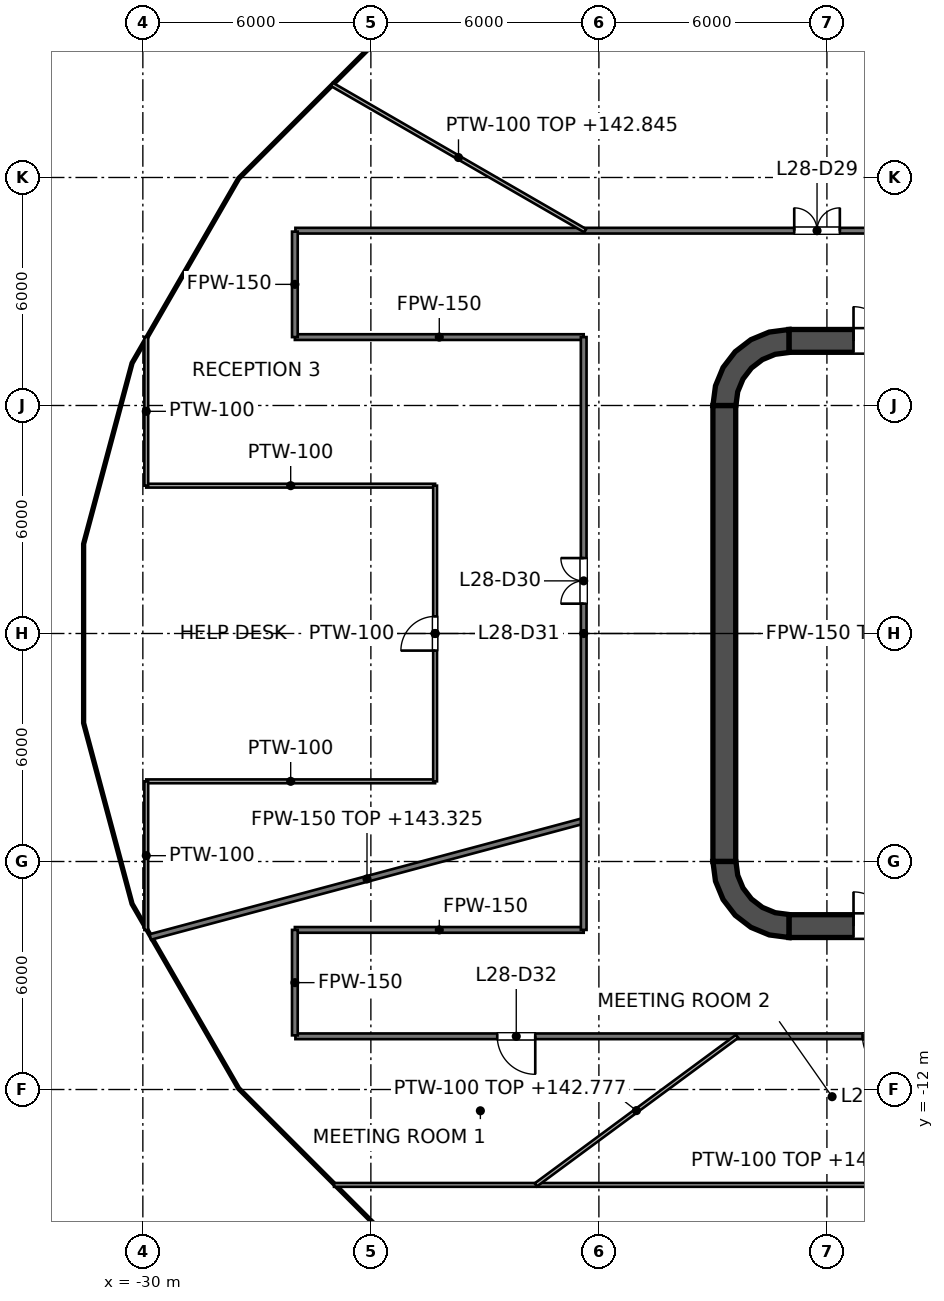
"""IFC4 building model, lengths in metres.
Left out: names, types, materials, properties, quantities, classifications, styles, units other than length and angle.
Written with IfcOpenShell. Run it as: python <this file> out.ifc"""

import sys

from ifc_helpers import new_model, si_unit, direction, frame, frame_2d, origin, place, context, subcontext, project, spatial, polyline, rectangle, outline, extrude, element, fill, save


model = new_model("IFC4")
c1 = context("Model", 3, precision=1e-05, world=origin(), true_north=direction((0.0, 1.0)))
c2 = subcontext(c1, "Body", "Model", "MODEL_VIEW")
j1 = project(units=[si_unit("LENGTHUNIT", "METRE"), si_unit("PLANEANGLEUNIT", "RADIAN")], contexts=[c1])
p1 = place(None, origin())
s1 = spatial("IfcSite", under=j1, at=p1, CompositionType="ELEMENT")
p2 = place(p1, origin())
s2 = spatial("IfcBuilding", under=s1, at=p2, CompositionType="ELEMENT")
p3 = place(p2, frame((0.0, 0.0, 139.8)))
s3 = spatial("IfcBuildingStorey", under=s2, at=p3, CompositionType="ELEMENT", Elevation=139.8)
p4 = place(p3, frame((-13.0, 7.7, 0.0), z_axis=(0.0, 0.0, 1.0), x_axis=(1.0, 0.0, 0.0)))
e1 = element("IfcWall", 1, at=p4, inside=s3, PredefinedType="SHEAR", context=c2, shape_type="SweptSolid", body=[
    extrude(rectangle(XDim=26.0, YDim=0.6, at=frame_2d((13.0, 0.0))), origin(), (0.0, 0.0, 1.0), 4.2),
])
p5 = place(p4, frame((1.7, 0.0, 0.0)))
e2 = element("IfcOpeningElement", 2, at=p5, cuts=e1, PredefinedType="OPENING", context=c2, shape_type="SweptSolid", body=[
    extrude(rectangle(XDim=1.8, YDim=2.1, at=frame_2d((0.9, 1.05))), frame((0.0, 0.3, 0.0), z_axis=(0.0, -1.0, 0.0), x_axis=(1.0, 0.0, 0.0)), (0.0, 0.0, 1.0), 0.6),
])
p6 = place(p4, frame((22.5, 0.0, 0.0)))
e3 = element("IfcOpeningElement", 3, at=p6, cuts=e1, PredefinedType="OPENING", context=c2, shape_type="SweptSolid", body=[
    extrude(rectangle(XDim=1.8, YDim=2.1, at=frame_2d((0.9, 1.05))), frame((0.0, 0.3, 0.0), z_axis=(0.0, -1.0, 0.0), x_axis=(1.0, 0.0, 0.0)), (0.0, 0.0, 1.0), 0.6),
])
p7 = place(p3, frame((-13.0, -7.7, 0.0), z_axis=(0.0, 0.0, 1.0), x_axis=(1.0, 0.0, 0.0)))
e4 = element("IfcWall", 4, at=p7, inside=s3, PredefinedType="SHEAR", context=c2, shape_type="SweptSolid", body=[
    extrude(rectangle(XDim=26.0, YDim=0.6, at=frame_2d((13.0, 0.0))), origin(), (0.0, 0.0, 1.0), 4.2),
])
p8 = place(p7, frame((1.7, 0.0, 0.0)))
e5 = element("IfcOpeningElement", 5, at=p8, cuts=e4, PredefinedType="OPENING", context=c2, shape_type="SweptSolid", body=[
    extrude(rectangle(XDim=1.8, YDim=2.1, at=frame_2d((0.9, 1.05))), frame((0.0, 0.3, 0.0), z_axis=(0.0, -1.0, 0.0), x_axis=(1.0, 0.0, 0.0)), (0.0, 0.0, 1.0), 0.6),
])
p9 = place(p7, frame((22.5, 0.0, 0.0)))
e6 = element("IfcOpeningElement", 6, at=p9, cuts=e4, PredefinedType="OPENING", context=c2, shape_type="SweptSolid", body=[
    extrude(rectangle(XDim=1.8, YDim=2.1, at=frame_2d((0.9, 1.05))), frame((0.0, 0.3, 0.0), z_axis=(0.0, -1.0, 0.0), x_axis=(1.0, 0.0, 0.0)), (0.0, 0.0, 1.0), 0.6),
])
p10 = place(p3, frame((-14.7, -6.0, 0.0), z_axis=(0.0, 0.0, 1.0), x_axis=(0.0, 1.0, 0.0)))
e7 = element("IfcWall", 7, at=p10, inside=s3, PredefinedType="SHEAR", context=c2, shape_type="SweptSolid", body=[
    extrude(rectangle(XDim=12.0, YDim=0.6, at=frame_2d((6.0, 0.0))), origin(), (0.0, 0.0, 1.0), 4.2),
])
p11 = place(p3, origin())
e8 = element("IfcWall", 8, at=p11, inside=s3, PredefinedType="SHEAR", context=c2, shape_type="SweptSolid", body=[
    extrude(outline(polyline([(-15.0, 6.0), (-14.395, 6.0), (-14.347, 6.361), (-14.208, 6.698), (-13.986, 6.986), (-13.698, 7.208), (-13.361, 7.347), (-13.0, 7.395), (-13.0, 8.0), (-13.518, 7.932), (-14.0, 7.732), (-14.414, 7.414), (-14.732, 7.0), (-14.932, 6.518), (-15.0, 6.0)])), origin(), (0.0, 0.0, 1.0), 4.2),
])
e9 = element("IfcWall", 9, at=p11, inside=s3, PredefinedType="SHEAR", context=c2, shape_type="SweptSolid", body=[
    extrude(outline(polyline([(-13.0, -8.0), (-13.0, -7.395), (-13.361, -7.347), (-13.698, -7.208), (-13.986, -6.986), (-14.208, -6.698), (-14.347, -6.361), (-14.395, -6.0), (-15.0, -6.0), (-14.932, -6.518), (-14.732, -7.0), (-14.414, -7.414), (-14.0, -7.732), (-13.518, -7.932), (-13.0, -8.0)])), origin(), (0.0, 0.0, 1.0), 4.2),
])
p12 = place(p3, frame((-11.8, -7.4, 0.0), z_axis=(0.0, 0.0, 1.0), x_axis=(0.0, 1.0, 0.0)))
e10 = element("IfcWall", 10, at=p12, inside=s3, PredefinedType="SOLIDWALL", context=c2, shape_type="SweptSolid", body=[
    extrude(rectangle(XDim=14.8, YDim=0.4, at=frame_2d((7.4, 0.0))), origin(), (0.0, 0.0, 1.0), 4.05),
])
p13 = place(p12, frame((11.2, 0.0, 0.0)))
e11 = element("IfcOpeningElement", 11, at=p13, cuts=e10, PredefinedType="OPENING", context=c2, shape_type="SweptSolid", body=[
    extrude(rectangle(XDim=1.1, YDim=2.1, at=frame_2d((0.55, 1.05))), frame((0.0, 0.2, 0.0), z_axis=(0.0, -1.0, 0.0), x_axis=(1.0, 0.0, 0.0)), (0.0, 0.0, 1.0), 0.4),
])
p14 = place(p12, frame((8.3, 0.0, 0.0)))
e12 = element("IfcOpeningElement", 12, at=p14, cuts=e10, PredefinedType="OPENING", context=c2, shape_type="SweptSolid", body=[
    extrude(rectangle(XDim=1.1, YDim=2.1, at=frame_2d((0.55, 1.05))), frame((0.0, 0.2, 0.0), z_axis=(0.0, -1.0, 0.0), x_axis=(1.0, 0.0, 0.0)), (0.0, 0.0, 1.0), 0.4),
])
p15 = place(p12, frame((5.4, 0.0, 0.0)))
e13 = element("IfcOpeningElement", 13, at=p15, cuts=e10, PredefinedType="OPENING", context=c2, shape_type="SweptSolid", body=[
    extrude(rectangle(XDim=1.1, YDim=2.1, at=frame_2d((0.55, 1.05))), frame((0.0, 0.2, 0.0), z_axis=(0.0, -1.0, 0.0), x_axis=(1.0, 0.0, 0.0)), (0.0, 0.0, 1.0), 0.4),
])
p16 = place(p12, frame((13.552, 0.0, 0.0)))
e14 = element("IfcOpeningElement", 14, at=p16, cuts=e10, PredefinedType="OPENING", context=c2, shape_type="SweptSolid", body=[
    extrude(rectangle(XDim=0.9, YDim=2.1, at=frame_2d((0.45, 1.05))), frame((0.0, 0.2, 0.0), z_axis=(0.0, -1.0, 0.0), x_axis=(1.0, 0.0, 0.0)), (0.0, 0.0, 1.0), 0.4),
])
p17 = place(p12, frame((0.347, 0.0, 0.0)))
e15 = element("IfcOpeningElement", 15, at=p17, cuts=e10, PredefinedType="OPENING", context=c2, shape_type="SweptSolid", body=[
    extrude(rectangle(XDim=0.9, YDim=2.1, at=frame_2d((0.45, 1.05))), frame((0.0, 0.2, 0.0), z_axis=(0.0, -1.0, 0.0), x_axis=(1.0, 0.0, 0.0)), (0.0, 0.0, 1.0), 0.4),
])
e16 = element("IfcWall", 16, at=p11, inside=s3, PredefinedType="SOLIDWALL", context=c2, shape_type="SweptSolid", body=[
    extrude(outline(polyline([(-12.0, -5.925), (-12.0, -5.675), (-14.15, -5.675), (-14.15, -3.025), (-12.0, -3.025), (-12.0, -2.775), (-14.15, -2.775), (-14.15, -0.125), (-12.0, -0.125), (-12.0, 0.125), (-14.15, 0.125), (-14.15, 2.775), (-12.0, 2.775), (-12.0, 3.025), (-14.15, 3.025), (-14.15, 5.675), (-12.0, 5.675), (-12.0, 5.925), (-14.15, 5.925), (-14.4, 5.925), (-14.4, 5.675), (-14.4, 3.025), (-14.4, 2.775), (-14.4, 0.125), (-14.4, -0.125), (-14.4, -2.775), (-14.4, -3.025), (-14.4, -5.675), (-14.4, -5.925), (-14.15, -5.925), (-12.0, -5.925)])), origin(), (0.0, 0.0, 1.0), 4.05),
])
p18 = place(p3, frame((-12.581, 21.79, 0.0), z_axis=(0.0, 0.0, 1.0), x_axis=(0.500038653944, -0.866003085769, 0.0)))
e17 = element("IfcWall", 17, at=p18, inside=s3, PredefinedType="PARTITIONING", context=c2, shape_type="SweptSolid", body=[
    extrude(rectangle(XDim=12.921, YDim=0.15, at=frame_2d((6.461, 0.0))), origin(), (0.0, 0.0, 1.0), 3.277),
])
p19 = place(p3, frame((-25.986, -10.6, 0.0), z_axis=(0.0, 0.0, 1.0), x_axis=(1.0, 0.0, 0.0)))
e18 = element("IfcWall", 18, at=p19, inside=s3, PredefinedType="PARTITIONING", context=c2, shape_type="SweptSolid", body=[
    extrude(rectangle(XDim=51.972, YDim=0.15, at=frame_2d((25.986, 0.0))), origin(), (0.0, 0.0, 1.0), 2.968),
])
p20 = place(p19, frame((47.628, 0.0, 0.0)))
e19 = element("IfcOpeningElement", 19, at=p20, cuts=e18, PredefinedType="OPENING", context=c2, shape_type="SweptSolid", body=[
    extrude(rectangle(XDim=1.0, YDim=2.1, at=frame_2d((0.5, 1.05))), frame((0.0, 0.075, 0.0), z_axis=(0.0, -1.0, 0.0), x_axis=(1.0, 0.0, 0.0)), (0.0, 0.0, 1.0), 0.15),
])
p21 = place(p19, frame((5.312, 0.0, 0.0)))
e20 = element("IfcOpeningElement", 20, at=p21, cuts=e18, PredefinedType="OPENING", context=c2, shape_type="SweptSolid", body=[
    extrude(rectangle(XDim=1.0, YDim=2.1, at=frame_2d((0.5, 1.05))), frame((0.0, 0.075, 0.0), z_axis=(0.0, -1.0, 0.0), x_axis=(1.0, 0.0, 0.0)), (0.0, 0.0, 1.0), 0.15),
])
p22 = place(p19, frame((14.924, 0.0, 0.0)))
e21 = element("IfcOpeningElement", 21, at=p22, cuts=e18, PredefinedType="OPENING", context=c2, shape_type="SweptSolid", body=[
    extrude(rectangle(XDim=1.0, YDim=2.1, at=frame_2d((0.5, 1.05))), frame((0.0, 0.075, 0.0), z_axis=(0.0, -1.0, 0.0), x_axis=(1.0, 0.0, 0.0)), (0.0, 0.0, 1.0), 0.15),
])
p23 = place(p19, frame((22.156, 0.0, 0.0)))
e22 = element("IfcOpeningElement", 22, at=p23, cuts=e18, PredefinedType="OPENING", context=c2, shape_type="SweptSolid", body=[
    extrude(rectangle(XDim=1.0, YDim=2.1, at=frame_2d((0.5, 1.05))), frame((0.0, 0.075, 0.0), z_axis=(0.0, -1.0, 0.0), x_axis=(1.0, 0.0, 0.0)), (0.0, 0.0, 1.0), 0.15),
])
p24 = place(p19, frame((27.795, 0.0, 0.0)))
e23 = element("IfcOpeningElement", 23, at=p24, cuts=e18, PredefinedType="OPENING", context=c2, shape_type="SweptSolid", body=[
    extrude(rectangle(XDim=1.0, YDim=2.1, at=frame_2d((0.5, 1.05))), frame((0.0, 0.075, 0.0), z_axis=(0.0, -1.0, 0.0), x_axis=(1.0, 0.0, 0.0)), (0.0, 0.0, 1.0), 0.15),
])
p25 = place(p19, frame((37.045, 0.0, 0.0)))
e24 = element("IfcOpeningElement", 24, at=p25, cuts=e18, PredefinedType="OPENING", context=c2, shape_type="SweptSolid", body=[
    extrude(rectangle(XDim=1.0, YDim=2.1, at=frame_2d((0.5, 1.05))), frame((0.0, 0.075, 0.0), z_axis=(0.0, -1.0, 0.0), x_axis=(1.0, 0.0, 0.0)), (0.0, 0.0, 1.0), 0.15),
])
for number, where, z_axis, x_axis in (
    (25, (-26.0, -7.8, 0.0), (0.0, 0.0, 1.0), (1.0, 0.0, 0.0)),
    (26, (-26.0, 7.8, 0.0), (0.0, 0.0, 1.0), (1.0, 0.0, 0.0)),
):
    element("IfcWall", number, at=place(p3, frame(where, z_axis=z_axis, x_axis=x_axis)), inside=s3, PredefinedType="PARTITIONING", context=c2, shape_type="SweptSolid", body=[
        extrude(rectangle(XDim=7.6, YDim=0.15, at=frame_2d((3.8, 0.0))), origin(), (0.0, 0.0, 1.0), 2.977),
    ])
p26 = place(p3, frame((-25.986, 10.6, 0.0), z_axis=(0.0, 0.0, 1.0), x_axis=(1.0, 0.0, 0.0)))
e27 = element("IfcWall", 27, at=p26, inside=s3, PredefinedType="PARTITIONING", context=c2, shape_type="SweptSolid", body=[
    extrude(rectangle(XDim=51.972, YDim=0.15, at=frame_2d((25.986, 0.0))), origin(), (0.0, 0.0, 1.0), 2.968),
])
p27 = place(p26, frame((42.031, 0.0, 0.0)))
e28 = element("IfcOpeningElement", 28, at=p27, cuts=e27, PredefinedType="OPENING", context=c2, shape_type="SweptSolid", body=[
    extrude(rectangle(XDim=1.0, YDim=2.1, at=frame_2d((0.5, 1.05))), frame((0.0, 0.075, 0.0), z_axis=(0.0, -1.0, 0.0), x_axis=(1.0, 0.0, 0.0)), (0.0, 0.0, 1.0), 0.15),
])
p28 = place(p26, frame((37.69, 0.0, 0.0)))
e29 = element("IfcOpeningElement", 29, at=p28, cuts=e27, PredefinedType="OPENING", context=c2, shape_type="SweptSolid", body=[
    extrude(rectangle(XDim=1.0, YDim=2.1, at=frame_2d((0.5, 1.05))), frame((0.0, 0.075, 0.0), z_axis=(0.0, -1.0, 0.0), x_axis=(1.0, 0.0, 0.0)), (0.0, 0.0, 1.0), 0.15),
])
p29 = place(p26, frame((32.156, 0.0, 0.0)))
e30 = element("IfcOpeningElement", 30, at=p29, cuts=e27, PredefinedType="OPENING", context=c2, shape_type="SweptSolid", body=[
    extrude(rectangle(XDim=1.0, YDim=2.1, at=frame_2d((0.5, 1.05))), frame((0.0, 0.075, 0.0), z_axis=(0.0, -1.0, 0.0), x_axis=(1.0, 0.0, 0.0)), (0.0, 0.0, 1.0), 0.15),
])
p30 = place(p26, frame((23.896, 0.0, 0.0)))
e31 = element("IfcOpeningElement", 31, at=p30, cuts=e27, PredefinedType="OPENING", context=c2, shape_type="SweptSolid", body=[
    extrude(rectangle(XDim=1.0, YDim=2.1, at=frame_2d((0.5, 1.05))), frame((0.0, 0.075, 0.0), z_axis=(0.0, -1.0, 0.0), x_axis=(1.0, 0.0, 0.0)), (0.0, 0.0, 1.0), 0.15),
])
p31 = place(p26, frame((13.126, 0.0, 0.0)))
e32 = element("IfcOpeningElement", 32, at=p31, cuts=e27, PredefinedType="OPENING", context=c2, shape_type="SweptSolid", body=[
    extrude(rectangle(XDim=1.2, YDim=2.1, at=frame_2d((0.6, 1.05))), frame((0.0, 0.075, 0.0), z_axis=(0.0, -1.0, 0.0), x_axis=(1.0, 0.0, 0.0)), (0.0, 0.0, 1.0), 0.15),
])
p32 = place(p3, frame((-29.804, -7.986, 0.0), z_axis=(0.0, 0.0, 1.0), x_axis=(0.965916389644, 0.258854260572, 0.0)))
e33 = element("IfcWall", 33, at=p32, inside=s3, PredefinedType="PARTITIONING", context=c2, shape_type="SweptSolid", body=[
    extrude(rectangle(XDim=11.806, YDim=0.15, at=frame_2d((5.903, 0.0))), origin(), (0.0, 0.0, 1.0), 3.525),
])
p33 = place(p3, frame((-18.4, -7.8, 0.0), z_axis=(0.0, 0.0, 1.0), x_axis=(0.0, 1.0, 0.0)))
e34 = element("IfcWall", 34, at=p33, inside=s3, PredefinedType="PARTITIONING", context=c2, shape_type="SweptSolid", body=[
    extrude(rectangle(XDim=15.6, YDim=0.15, at=frame_2d((7.8, 0.0))), origin(), (0.0, 0.0, 1.0), 2.968),
])
p34 = place(p33, frame((8.585, 0.0, 0.0)))
e35 = element("IfcOpeningElement", 35, at=p34, cuts=e34, PredefinedType="OPENING", context=c2, shape_type="SweptSolid", body=[
    extrude(rectangle(XDim=1.2, YDim=2.1, at=frame_2d((0.6, 1.05))), frame((0.0, 0.075, 0.0), z_axis=(0.0, -1.0, 0.0), x_axis=(1.0, 0.0, 0.0)), (0.0, 0.0, 1.0), 0.15),
])
for number, where, z_axis, x_axis in (
    (36, (-26.0, -10.575, 0.0), (0.0, 0.0, 1.0), (0.0, 1.0, 0.0)),
    (37, (-26.0, 7.8, 0.0), (0.0, 0.0, 1.0), (0.0, 1.0, 0.0)),
):
    element("IfcWall", number, at=place(p3, frame(where, z_axis=z_axis, x_axis=x_axis)), inside=s3, PredefinedType="PARTITIONING", context=c2, shape_type="SweptSolid", body=[
        extrude(rectangle(XDim=2.775, YDim=0.15, at=frame_2d((1.387, 0.0))), origin(), (0.0, 0.0, 1.0), 2.977),
    ])
p35 = place(p3, frame((-25.029, 14.451, 0.0), z_axis=(0.0, 0.0, 1.0), x_axis=(0.865996573404, -0.500049932359, 0.0)))
e38 = element("IfcWall", 38, at=p35, inside=s3, PredefinedType="PARTITIONING", context=c2, shape_type="SweptSolid", body=[
    extrude(rectangle(XDim=7.701, YDim=0.1, at=frame_2d((3.851, 0.0))), origin(), (0.0, 0.0, 1.0), 3.045),
])
p36 = place(p3, frame((-24.97, -14.51, 0.0), z_axis=(0.0, 0.0, 1.0), x_axis=(1.0, 0.0, 0.0)))
e39 = element("IfcWall", 39, at=p36, inside=s3, PredefinedType="PARTITIONING", context=c2, shape_type="SweptSolid", body=[
    extrude(rectangle(XDim=49.94, YDim=0.1, at=frame_2d((24.97, 0.0))), origin(), (0.0, 0.0, 1.0), 2.968),
])
p37 = place(p36, frame((19.461, 0.0, 0.0)))
e40 = element("IfcOpeningElement", 40, at=p37, cuts=e39, PredefinedType="OPENING", context=c2, shape_type="SweptSolid", body=[
    extrude(rectangle(XDim=1.8, YDim=2.1, at=frame_2d((0.9, 1.05))), frame((0.0, 0.05, 0.0), z_axis=(0.0, -1.0, 0.0), x_axis=(1.0, 0.0, 0.0)), (0.0, 0.0, 1.0), 0.1),
])
p38 = place(p36, frame((39.835, 0.0, 0.0)))
e41 = element("IfcOpeningElement", 41, at=p38, cuts=e39, PredefinedType="OPENING", context=c2, shape_type="SweptSolid", body=[
    extrude(rectangle(XDim=1.8, YDim=2.1, at=frame_2d((0.9, 1.05))), frame((0.0, 0.05, 0.0), z_axis=(0.0, -1.0, 0.0), x_axis=(1.0, 0.0, 0.0)), (0.0, 0.0, 1.0), 0.1),
])
for number, where, z_axis, x_axis in (
    (42, (-29.91, -3.89, 0.0), (0.0, 0.0, 1.0), (1.0, 0.0, 0.0)),
    (43, (-29.91, 3.89, 0.0), (0.0, 0.0, 1.0), (1.0, 0.0, 0.0)),
):
    element("IfcWall", number, at=place(p3, frame(where, z_axis=z_axis, x_axis=x_axis)), inside=s3, PredefinedType="PARTITIONING", context=c2, shape_type="SweptSolid", body=[
        extrude(rectangle(XDim=7.6, YDim=0.1, at=frame_2d((3.8, 0.0))), origin(), (0.0, 0.0, 1.0), 2.968),
    ])
p39 = place(p3, frame((-19.661, -14.51, 0.0), z_axis=(0.0, 0.0, 1.0), x_axis=(0.804603605329, 0.593812292136, 0.0)))
e44 = element("IfcWall", 44, at=p39, inside=s3, PredefinedType="PARTITIONING", context=c2, shape_type="SweptSolid", body=[
    extrude(rectangle(XDim=6.584, YDim=0.1, at=frame_2d((3.292, 0.0))), origin(), (0.0, 0.0, 1.0), 2.977),
])
p40 = place(p3, frame((-22.31, -3.89, 0.0), z_axis=(0.0, 0.0, 1.0), x_axis=(0.0, 1.0, 0.0)))
e45 = element("IfcWall", 45, at=p40, inside=s3, PredefinedType="PARTITIONING", context=c2, shape_type="SweptSolid", body=[
    extrude(rectangle(XDim=7.78, YDim=0.1, at=frame_2d((3.89, 0.0))), origin(), (0.0, 0.0, 1.0), 2.968),
])
p41 = place(p40, frame((3.44, 0.0, 0.0)))
e46 = element("IfcOpeningElement", 46, at=p41, cuts=e45, PredefinedType="OPENING", context=c2, shape_type="SweptSolid", body=[
    extrude(rectangle(XDim=0.9, YDim=2.1, at=frame_2d((0.45, 1.05))), frame((0.0, 0.05, 0.0), z_axis=(0.0, -1.0, 0.0), x_axis=(1.0, 0.0, 0.0)), (0.0, 0.0, 1.0), 0.1),
])
for number, where, z_axis, x_axis in (
    (47, (-29.91, -7.803, 0.0), (0.0, 0.0, 1.0), (0.0, 1.0, 0.0)),
    (48, (-29.91, 3.89, 0.0), (0.0, 0.0, 1.0), (0.0, 1.0, 0.0)),
):
    element("IfcWall", number, at=place(p3, frame(where, z_axis=z_axis, x_axis=x_axis)), inside=s3, PredefinedType="PARTITIONING", context=c2, shape_type="SweptSolid", body=[
        extrude(rectangle(XDim=3.913, YDim=0.1, at=frame_2d((1.957, 0.0))), origin(), (0.0, 0.0, 1.0), 2.968),
    ])
p42 = place(p13, origin())
e49 = element("IfcDoor", 49, at=p42, inside=s3, OperationType="DOUBLE_DOOR_SLIDING", PredefinedType="DOOR", context=c2, shape_type="SweptSolid", body=[
    extrude(rectangle(XDim=1.1, YDim=2.1, at=frame_2d((0.55, 1.05))), frame((0.0, 0.025, 0.0), z_axis=(0.0, -1.0, 0.0), x_axis=(1.0, 0.0, 0.0)), (0.0, 0.0, 1.0), 0.05),
])
fill(e11, e49)
p43 = place(p14, origin())
e50 = element("IfcDoor", 50, at=p43, inside=s3, OperationType="DOUBLE_DOOR_SLIDING", PredefinedType="DOOR", context=c2, shape_type="SweptSolid", body=[
    extrude(rectangle(XDim=1.1, YDim=2.1, at=frame_2d((0.55, 1.05))), frame((0.0, 0.025, 0.0), z_axis=(0.0, -1.0, 0.0), x_axis=(1.0, 0.0, 0.0)), (0.0, 0.0, 1.0), 0.05),
])
fill(e12, e50)
p44 = place(p15, origin())
e51 = element("IfcDoor", 51, at=p44, inside=s3, OperationType="DOUBLE_DOOR_SLIDING", PredefinedType="DOOR", context=c2, shape_type="SweptSolid", body=[
    extrude(rectangle(XDim=1.1, YDim=2.1, at=frame_2d((0.55, 1.05))), frame((0.0, 0.025, 0.0), z_axis=(0.0, -1.0, 0.0), x_axis=(1.0, 0.0, 0.0)), (0.0, 0.0, 1.0), 0.05),
])
fill(e13, e51)
p45 = place(p16, origin())
e52 = element("IfcDoor", 52, at=p45, inside=s3, OperationType="SINGLE_SWING_LEFT", PredefinedType="DOOR", context=c2, shape_type="SweptSolid", body=[
    extrude(rectangle(XDim=0.9, YDim=2.1, at=frame_2d((0.45, 1.05))), frame((0.0, 0.025, 0.0), z_axis=(0.0, -1.0, 0.0), x_axis=(1.0, 0.0, 0.0)), (0.0, 0.0, 1.0), 0.05),
])
fill(e14, e52)
p46 = place(p17, origin())
e53 = element("IfcDoor", 53, at=p46, inside=s3, OperationType="SINGLE_SWING_LEFT", PredefinedType="DOOR", context=c2, shape_type="SweptSolid", body=[
    extrude(rectangle(XDim=0.9, YDim=2.1, at=frame_2d((0.45, 1.05))), frame((0.0, 0.025, 0.0), z_axis=(0.0, -1.0, 0.0), x_axis=(1.0, 0.0, 0.0)), (0.0, 0.0, 1.0), 0.05),
])
fill(e15, e53)
p47 = place(p5, origin())
e54 = element("IfcDoor", 54, at=p47, inside=s3, OperationType="DOUBLE_DOOR_SINGLE_SWING", PredefinedType="DOOR", context=c2, shape_type="SweptSolid", body=[
    extrude(rectangle(XDim=1.8, YDim=2.1, at=frame_2d((0.9, 1.05))), frame((0.0, 0.025, 0.0), z_axis=(0.0, -1.0, 0.0), x_axis=(1.0, 0.0, 0.0)), (0.0, 0.0, 1.0), 0.05),
])
fill(e2, e54)
p48 = place(p8, origin())
e55 = element("IfcDoor", 55, at=p48, inside=s3, OperationType="DOUBLE_DOOR_SINGLE_SWING", PredefinedType="DOOR", context=c2, shape_type="SweptSolid", body=[
    extrude(rectangle(XDim=1.8, YDim=2.1, at=frame_2d((0.9, 1.05))), frame((0.0, 0.025, 0.0), z_axis=(0.0, -1.0, 0.0), x_axis=(1.0, 0.0, 0.0)), (0.0, 0.0, 1.0), 0.05),
])
fill(e5, e55)
p49 = place(p31, origin())
e56 = element("IfcDoor", 56, at=p49, inside=s3, OperationType="DOUBLE_DOOR_SINGLE_SWING", PredefinedType="DOOR", context=c2, shape_type="SweptSolid", body=[
    extrude(rectangle(XDim=1.2, YDim=2.1, at=frame_2d((0.6, 1.05))), frame((0.0, 0.025, 0.0), z_axis=(0.0, -1.0, 0.0), x_axis=(1.0, 0.0, 0.0)), (0.0, 0.0, 1.0), 0.05),
])
fill(e32, e56)
p50 = place(p34, origin())
e57 = element("IfcDoor", 57, at=p50, inside=s3, OperationType="DOUBLE_DOOR_SINGLE_SWING", PredefinedType="DOOR", context=c2, shape_type="SweptSolid", body=[
    extrude(rectangle(XDim=1.2, YDim=2.1, at=frame_2d((0.6, 1.05))), frame((0.0, 0.025, 0.0), z_axis=(0.0, -1.0, 0.0), x_axis=(1.0, 0.0, 0.0)), (0.0, 0.0, 1.0), 0.05),
])
fill(e35, e57)
p51 = place(p41, origin())
e58 = element("IfcDoor", 58, at=p51, inside=s3, OperationType="SINGLE_SWING_LEFT", PredefinedType="DOOR", context=c2, shape_type="SweptSolid", body=[
    extrude(rectangle(XDim=0.9, YDim=2.1, at=frame_2d((0.45, 1.05))), frame((0.0, 0.025, 0.0), z_axis=(0.0, -1.0, 0.0), x_axis=(1.0, 0.0, 0.0)), (0.0, 0.0, 1.0), 0.05),
])
fill(e46, e58)
p52 = place(p21, origin())
e59 = element("IfcDoor", 59, at=p52, inside=s3, OperationType="SINGLE_SWING_RIGHT", PredefinedType="DOOR", context=c2, shape_type="SweptSolid", body=[
    extrude(rectangle(XDim=1.0, YDim=2.1, at=frame_2d((0.5, 1.05))), frame((0.0, 0.025, 0.0), z_axis=(0.0, -1.0, 0.0), x_axis=(1.0, 0.0, 0.0)), (0.0, 0.0, 1.0), 0.05),
])
fill(e20, e59)
p53 = place(p22, origin())
e60 = element("IfcDoor", 60, at=p53, inside=s3, OperationType="SINGLE_SWING_RIGHT", PredefinedType="DOOR", context=c2, shape_type="SweptSolid", body=[
    extrude(rectangle(XDim=1.0, YDim=2.1, at=frame_2d((0.5, 1.05))), frame((0.0, 0.025, 0.0), z_axis=(0.0, -1.0, 0.0), x_axis=(1.0, 0.0, 0.0)), (0.0, 0.0, 1.0), 0.05),
])
fill(e21, e60)
save(model, sys.argv[1])
